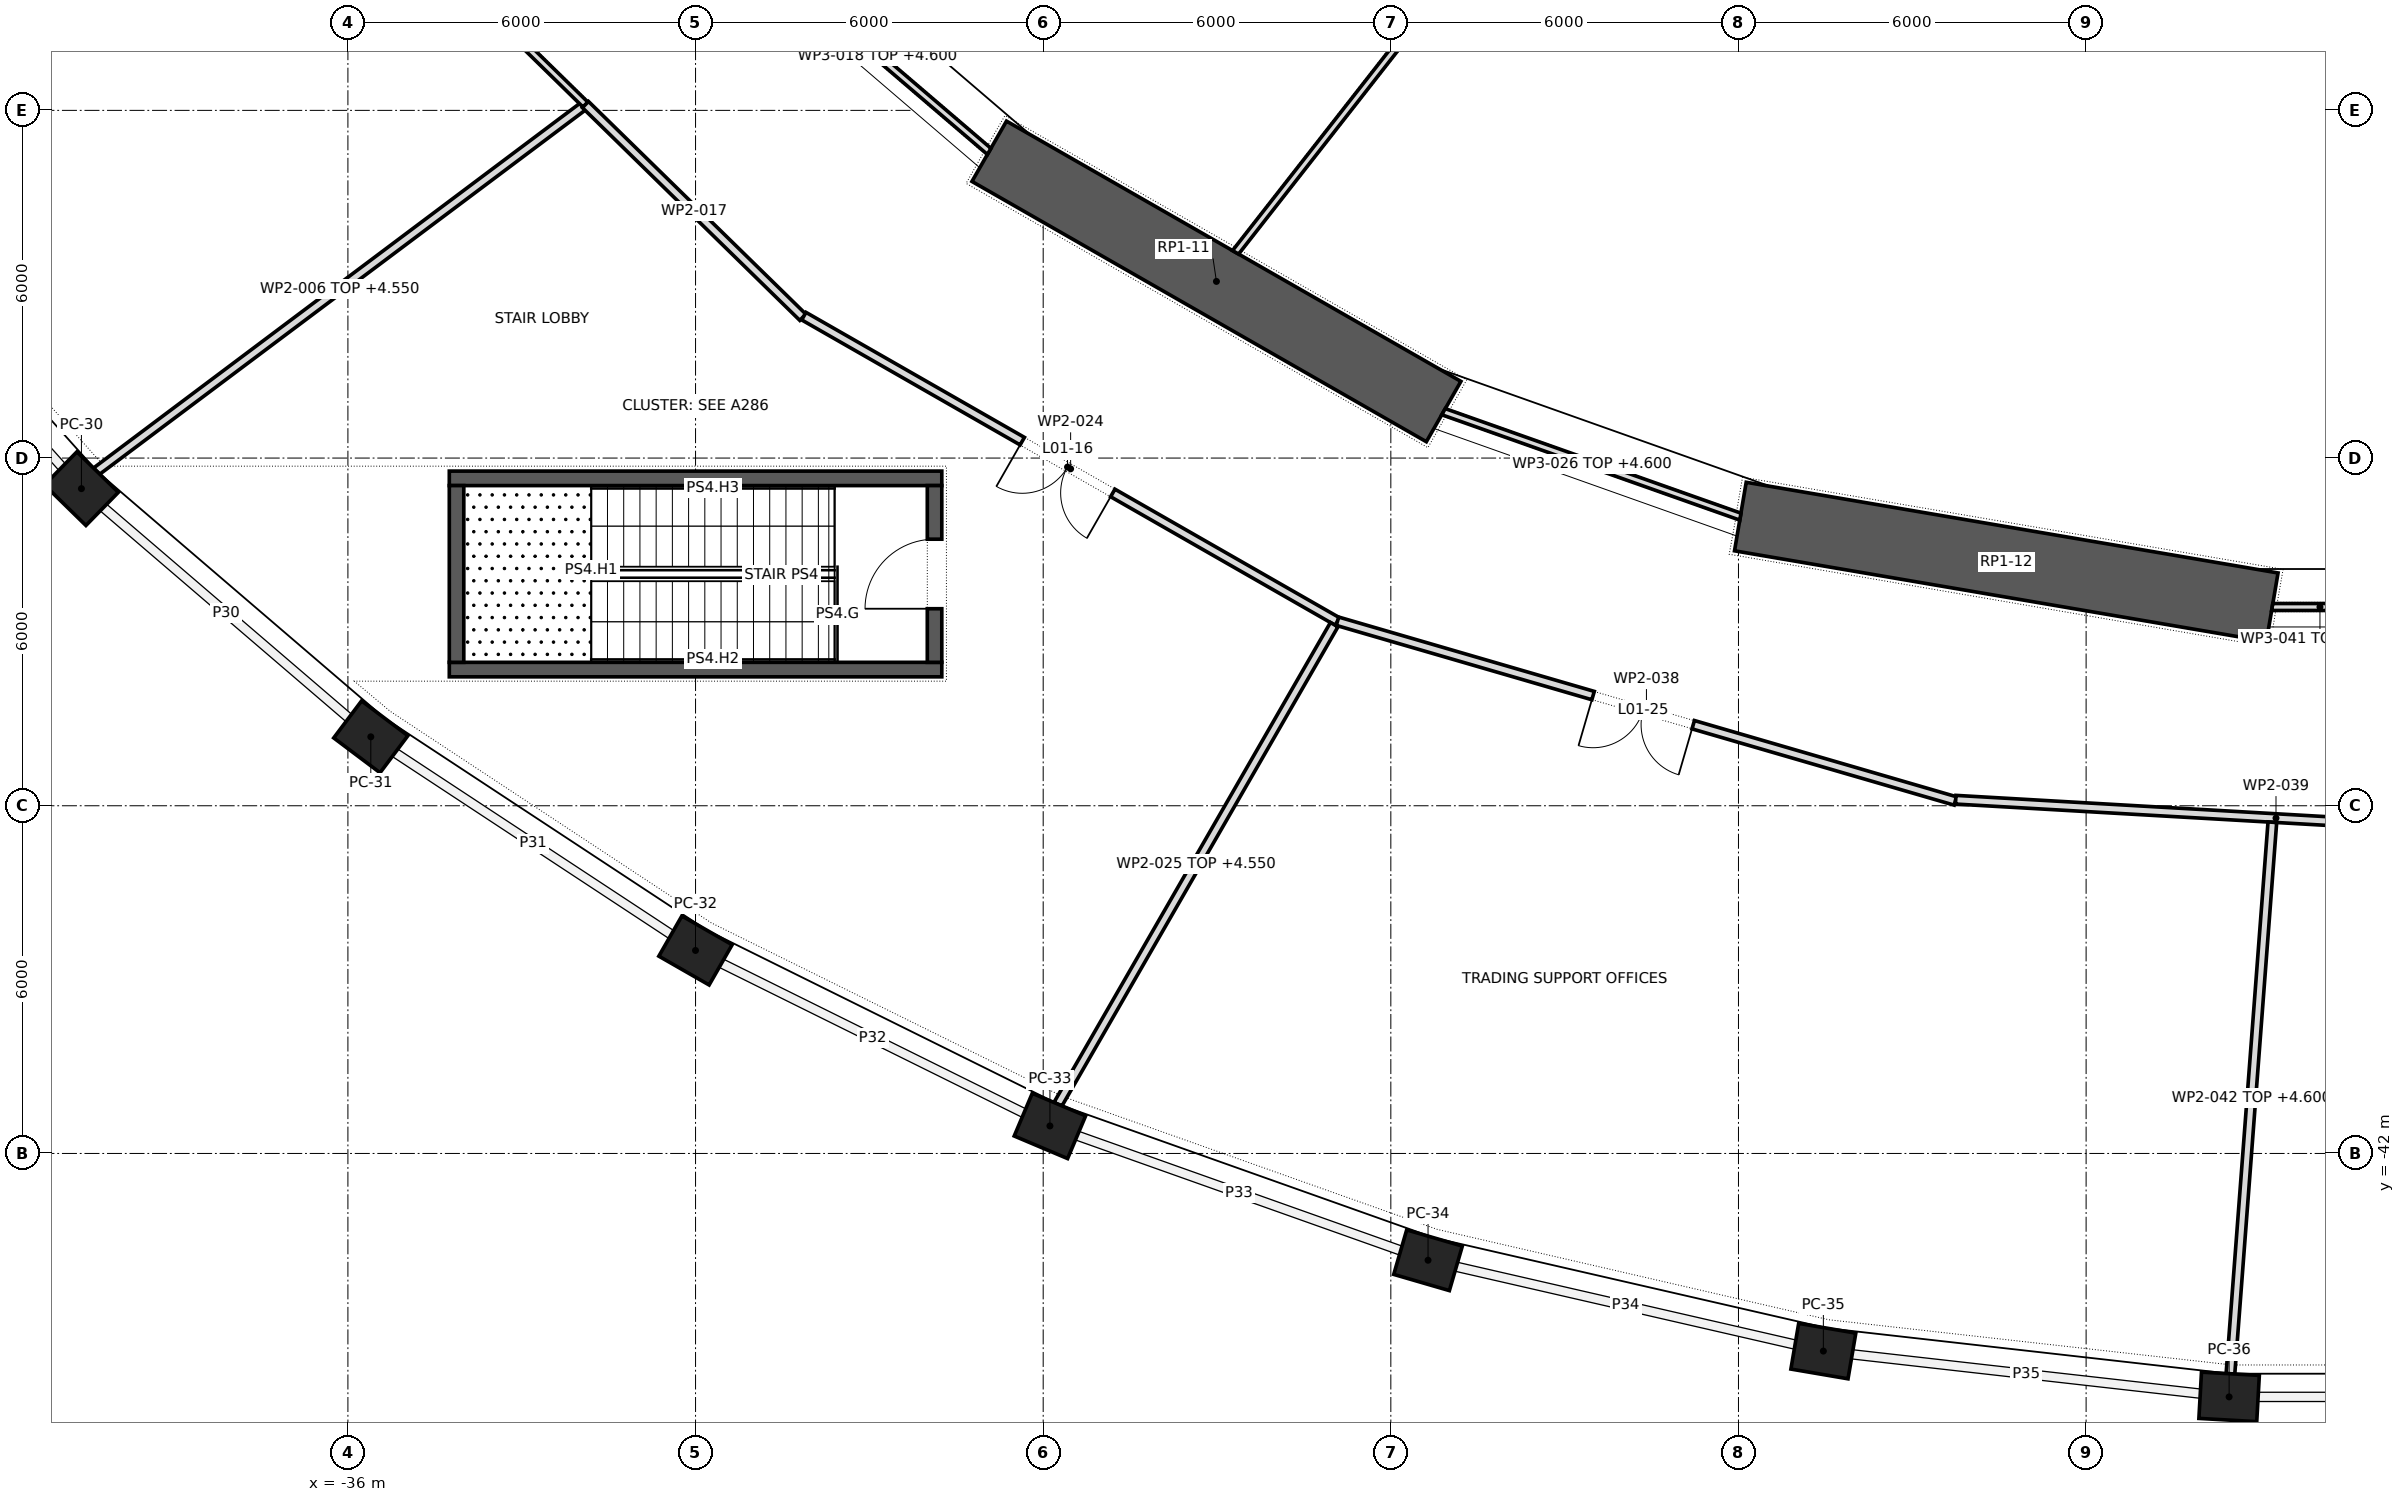
"""IFC4 building model, lengths in metres.
Left out: names, types, materials, properties, quantities, classifications, styles, units other than length and angle.
Written with IfcOpenShell. Run it as: python <this file> out.ifc"""

import sys

from ifc_helpers import new_model, si_unit, direction, frame, frame_2d, origin, origin_2d, place, context, subcontext, project, spatial, polyline, rectangle, outline, extrude, element, fill, save


model = new_model("IFC4")
c1 = context("Model", 3, precision=1e-05, world=origin(), true_north=direction((0.0, 1.0)))
c2 = subcontext(c1, "Body", "Model", "MODEL_VIEW")
j1 = project(units=[si_unit("LENGTHUNIT", "METRE"), si_unit("PLANEANGLEUNIT", "RADIAN")], contexts=[c1])
p1 = place(None, origin())
s1 = spatial("IfcSite", under=j1, at=p1, CompositionType="ELEMENT")
p2 = place(p1, origin())
s2 = spatial("IfcBuilding", under=s1, at=p2, CompositionType="ELEMENT")
p3 = place(p2, frame((0.0, 0.0, 7.0)))
s3 = spatial("IfcBuildingStorey", under=s2, at=p3, CompositionType="ELEMENT", Elevation=7.0)
for number, where, z_axis, x_axis in (
    (1, (-40.599, -30.528, 0.0), (0.0, 0.0, 1.0), (0.715, -0.699, 0.0)),
    (2, (-35.605, -34.81, 0.0), (0.0, 0.0, 1.0), (0.799, -0.601, 0.0)),
    (3, (-30.001, -38.497, 0.0), (0.0, 0.0, 1.0), (0.868, -0.497, 0.0)),
    (4, (-23.884, -41.525, 0.0), (0.0, 0.0, 1.0), (0.921, -0.389, 0.0)),
    (5, (-17.358, -43.843, 0.0), (0.0, 0.0, 1.0), (0.96, -0.279, 0.0)),
    (6, (-10.535, -45.41, 0.0), (0.0, 0.0, 1.0), (0.986, -0.168, 0.0)),
    (7, (-3.532, -46.201, 0.0), (0.0, 0.0, 1.0), (0.998, -0.056, 0.0)),
):
    element("IfcColumn", number, at=place(p3, frame(where, z_axis=z_axis, x_axis=x_axis)), inside=s3, PredefinedType="COLUMN", context=c2, shape_type="SweptSolid", body=[
        extrude(rectangle(XDim=1.0, YDim=0.8, at=origin_2d()), origin(), (0.0, 0.0, 1.0), 5.5),
    ])
p4 = place(p3, frame((-24.931, -24.706, 0.0), z_axis=(0.0, 0.0, 1.0), x_axis=(0.867760656864, -0.496982336103, 0.0)))
e8 = element("IfcWall", 8, at=p4, inside=s3, PredefinedType="SHEAR", context=c2, shape_type="SweptSolid", body=[
    extrude(rectangle(XDim=9.038, YDim=1.2, at=frame_2d((4.519, 0.0))), origin(), (0.0, 0.0, 1.0), 5.5),
])
p5 = place(p3, frame((-11.967, -31.009, 0.0), z_axis=(0.0, 0.0, 1.0), x_axis=(0.985776286846, -0.168062822456, 0.0)))
e9 = element("IfcWall", 9, at=p5, inside=s3, PredefinedType="SHEAR", context=c2, shape_type="SweptSolid", body=[
    extrude(rectangle(XDim=9.312, YDim=1.2, at=frame_2d((4.656, 0.0))), origin(), (0.0, 0.0, 1.0), 5.5),
])
for number, where, z_axis, x_axis in (
    (10, (-34.25, -30.35, 0.0), (0.0, 0.0, 1.0), (1.0, 0.0, 0.0)),
    (11, (-34.25, -33.65, 0.0), (0.0, 0.0, 1.0), (1.0, 0.0, 0.0)),
):
    element("IfcWall", number, at=place(p3, frame(where, z_axis=z_axis, x_axis=x_axis)), inside=s3, PredefinedType="SHEAR", context=c2, shape_type="SweptSolid", body=[
        extrude(rectangle(XDim=8.5, YDim=0.25, at=frame_2d((4.25, 0.0))), origin(), (0.0, 0.0, 1.0), 5.15),
    ])
p6 = place(p3, frame((-34.125, -33.525, 0.0), z_axis=(0.0, 0.0, 1.0), x_axis=(0.0, 1.0, 0.0)))
e12 = element("IfcWall", 12, at=p6, inside=s3, PredefinedType="SHEAR", context=c2, shape_type="SweptSolid", body=[
    extrude(rectangle(XDim=3.05, YDim=0.25, at=frame_2d((1.525, 0.0))), origin(), (0.0, 0.0, 1.0), 5.15),
])
p7 = place(p3, frame((-25.875, -33.525, 0.0), z_axis=(0.0, 0.0, 1.0), x_axis=(0.0, 1.0, 0.0)))
e13 = element("IfcWall", 13, at=p7, inside=s3, PredefinedType="SHEAR", context=c2, shape_type="SweptSolid", body=[
    extrude(rectangle(XDim=3.05, YDim=0.25, at=frame_2d((1.525, 0.0))), origin(), (0.0, 0.0, 1.0), 5.15),
])
p8 = place(p7, frame((0.925, 0.0, 0.0)))
e14 = element("IfcOpeningElement", 14, at=p8, cuts=e13, PredefinedType="OPENING", context=c2, shape_type="SweptSolid", body=[
    extrude(rectangle(XDim=1.2, YDim=2.1, at=frame_2d((0.6, 1.05))), frame((0.0, 0.137, 0.0), z_axis=(0.0, -1.0, 0.0), x_axis=(1.0, 0.0, 0.0)), (0.0, 0.0, 1.0), 0.274),
])
p9 = place(p3, frame((-40.337, -30.226, 0.0), z_axis=(0.0, 0.0, 1.0), x_axis=(0.800114543622, 0.599847244792, 0.0)))
e15 = element("IfcWall", 15, at=p9, inside=s3, PredefinedType="PARTITIONING", context=c2, shape_type="SweptSolid", body=[
    extrude(outline(polyline([(0.011, -0.075), (10.485, -0.075), (10.485, 0.075), (-0.011, 0.075), (0.011, -0.075)])), origin(), (0.0, 0.0, 1.0), 4.55),
])
p10 = place(p3, frame((-35.51, -20.369, 0.0), z_axis=(0.0, 0.0, 1.0), x_axis=(0.714847158957, -0.699280729987, 0.0)))
e16 = element("IfcWall", 16, at=p10, inside=s3, PredefinedType="PARTITIONING", context=c2, shape_type="SweptSolid", body=[
    extrude(rectangle(XDim=5.05, YDim=0.12, at=frame_2d((2.525, 0.0))), origin(), (0.0, 0.0, 1.0), 5.15),
])
p11 = place(p3, frame((-31.9, -23.9, 0.0), z_axis=(0.0, 0.0, 1.0), x_axis=(0.714809256367, -0.699319474212, 0.0)))
e17 = element("IfcWall", 17, at=p11, inside=s3, PredefinedType="PARTITIONING", context=c2, shape_type="SweptSolid", body=[
    extrude(rectangle(XDim=5.249, YDim=0.15, at=frame_2d((2.624, 0.0))), origin(), (0.0, 0.0, 1.0), 5.15),
])
p12 = place(p3, frame((-28.789, -21.411, 0.0), z_axis=(0.0, 0.0, 1.0), x_axis=(0.760084552743, -0.649824185978, 0.0)))
e18 = element("IfcWall", 18, at=p12, inside=s3, PredefinedType="PARTITIONING", context=c2, shape_type="SweptSolid", body=[
    extrude(outline(polyline([(-0.012, -0.06), (5.086, -0.06), (5.063, 0.06), (0.012, 0.06), (-0.012, -0.06)])), origin(), (0.0, 0.0, 1.0), 4.6),
])
p13 = place(p3, frame((-20.68, -26.45, 0.0), z_axis=(0.0, 0.0, 1.0), x_axis=(0.616462447015, 0.787384309864, 0.0)))
e19 = element("IfcWall", 19, at=p13, inside=s3, PredefinedType="PARTITIONING", context=c2, shape_type="SweptSolid", body=[
    extrude(outline(polyline([(0.009, -0.06), (14.131, -0.06), (14.131, 0.06), (-0.009, 0.06), (0.009, -0.06)])), origin(), (0.0, 0.0, 1.0), 5.15),
])
p14 = place(p3, frame((-18.922, -32.82, 0.0), z_axis=(0.0, 0.0, 1.0), x_axis=(-0.867956944139, 0.496639449823, 0.0)))
e20 = element("IfcWall", 20, at=p14, inside=s3, PredefinedType="PARTITIONING", context=c2, shape_type="SweptSolid", body=[
    extrude(rectangle(XDim=10.609, YDim=0.15, at=frame_2d((5.305, 0.0))), origin(), (0.0, 0.0, 1.0), 5.15),
])
p15 = place(p14, frame((4.466, 0.0, 0.0)))
e21 = element("IfcOpeningElement", 21, at=p15, cuts=e20, PredefinedType="OPENING", context=c2, shape_type="SweptSolid", body=[
    extrude(rectangle(XDim=1.8, YDim=2.1, at=frame_2d((0.9, 1.05))), frame((0.0, 0.087, 0.0), z_axis=(0.0, -1.0, 0.0), x_axis=(1.0, 0.0, 0.0)), (0.0, 0.0, 1.0), 0.174),
])
p16 = place(p3, frame((-18.977, -32.875, 0.0), z_axis=(0.0, 0.0, 1.0), x_axis=(-0.499235523932, -0.866466324588, 0.0)))
e22 = element("IfcWall", 22, at=p16, inside=s3, PredefinedType="PARTITIONING", context=c2, shape_type="SweptSolid", body=[
    extrude(outline(polyline([(0.0, -0.075), (9.56, -0.075), (9.542, 0.075), (0.0, 0.075), (0.0, -0.075)])), origin(), (0.0, 0.0, 1.0), 4.55),
])
p17 = place(p3, frame((-17.091, -29.2, 0.0), z_axis=(0.0, 0.0, 1.0), x_axis=(0.942814385805, -0.333318217204, 0.0)))
e23 = element("IfcWall", 23, at=p17, inside=s3, PredefinedType="PARTITIONING", context=c2, shape_type="SweptSolid", body=[
    extrude(outline(polyline([(-0.011, -0.06), (5.445, -0.06), (5.425, 0.06), (0.011, 0.06), (-0.011, -0.06)])), origin(), (0.0, 0.0, 1.0), 4.6),
])
p18 = place(p3, frame((-8.256, -35.917, 0.0), z_axis=(0.0, 0.0, 1.0), x_axis=(-0.960212446938, 0.279270579805, 0.0)))
e24 = element("IfcWall", 24, at=p18, inside=s3, PredefinedType="PARTITIONING", context=c2, shape_type="SweptSolid", body=[
    extrude(rectangle(XDim=11.106, YDim=0.15, at=frame_2d((5.553, 0.0))), origin(), (0.0, 0.0, 1.0), 5.15),
])
p19 = place(p18, frame((4.712, 0.0, 0.0)))
e25 = element("IfcOpeningElement", 25, at=p19, cuts=e24, PredefinedType="OPENING", context=c2, shape_type="SweptSolid", body=[
    extrude(rectangle(XDim=1.8, YDim=2.1, at=frame_2d((0.9, 1.05))), frame((0.0, 0.087, 0.0), z_axis=(0.0, -1.0, 0.0), x_axis=(1.0, 0.0, 0.0)), (0.0, 0.0, 1.0), 0.174),
])
p20 = place(p3, frame((-8.251, -35.896, 0.0), z_axis=(0.0, 0.0, 1.0), x_axis=(0.998353419448, -0.057362443082, 0.0)))
e26 = element("IfcWall", 26, at=p20, inside=s3, PredefinedType="PARTITIONING", context=c2, shape_type="SweptSolid", body=[
    extrude(rectangle(XDim=11.074, YDim=0.15, at=frame_2d((5.537, 0.0))), origin(), (0.0, 0.0, 1.0), 5.15),
])
p21 = place(p3, frame((-2.788, -32.57, 0.0), z_axis=(0.0, 0.0, 1.0), x_axis=(1.0, 0.0, 0.0)))
e27 = element("IfcWall", 27, at=p21, inside=s3, PredefinedType="PARTITIONING", context=c2, shape_type="SweptSolid", body=[
    extrude(outline(polyline([(-0.01, -0.06), (1.648, -0.06), (1.648, 0.06), (0.01, 0.06), (-0.01, -0.06)])), origin(), (0.0, 0.0, 1.0), 4.6),
])
p22 = place(p3, frame((-2.786, -36.284, 0.0), z_axis=(0.0, 0.0, 1.0), x_axis=(-0.075755724104, -0.997126406363, 0.0)))
e28 = element("IfcWall", 28, at=p22, inside=s3, PredefinedType="PARTITIONING", context=c2, shape_type="SweptSolid", body=[
    extrude(rectangle(XDim=9.546, YDim=0.15, at=frame_2d((4.773, 0.0))), origin(), (0.0, 0.0, 1.0), 4.6),
])
p23 = place(p8, origin())
e29 = element("IfcDoor", 29, at=p23, inside=s3, OperationType="SINGLE_SWING_RIGHT", PredefinedType="DOOR", context=c2, shape_type="SweptSolid", body=[
    extrude(rectangle(XDim=1.2, YDim=2.1, at=frame_2d((0.6, 1.05))), frame((0.0, 0.025, 0.0), z_axis=(0.0, -1.0, 0.0), x_axis=(1.0, 0.0, 0.0)), (0.0, 0.0, 1.0), 0.05),
])
fill(e14, e29)
p24 = place(p15, origin())
e30 = element("IfcDoor", 30, at=p24, inside=s3, OperationType="DOUBLE_DOOR_SINGLE_SWING", PredefinedType="DOOR", context=c2, shape_type="SweptSolid", body=[
    extrude(rectangle(XDim=1.8, YDim=2.1, at=frame_2d((0.9, 1.05))), frame((0.0, 0.025, 0.0), z_axis=(0.0, -1.0, 0.0), x_axis=(1.0, 0.0, 0.0)), (0.0, 0.0, 1.0), 0.05),
])
fill(e21, e30)
p25 = place(p19, origin())
e31 = element("IfcDoor", 31, at=p25, inside=s3, OperationType="DOUBLE_DOOR_SINGLE_SWING", PredefinedType="DOOR", context=c2, shape_type="SweptSolid", body=[
    extrude(rectangle(XDim=1.8, YDim=2.1, at=frame_2d((0.9, 1.05))), frame((0.0, 0.025, 0.0), z_axis=(0.0, -1.0, 0.0), x_axis=(1.0, 0.0, 0.0)), (0.0, 0.0, 1.0), 0.05),
])
fill(e25, e31)
save(model, sys.argv[1])
